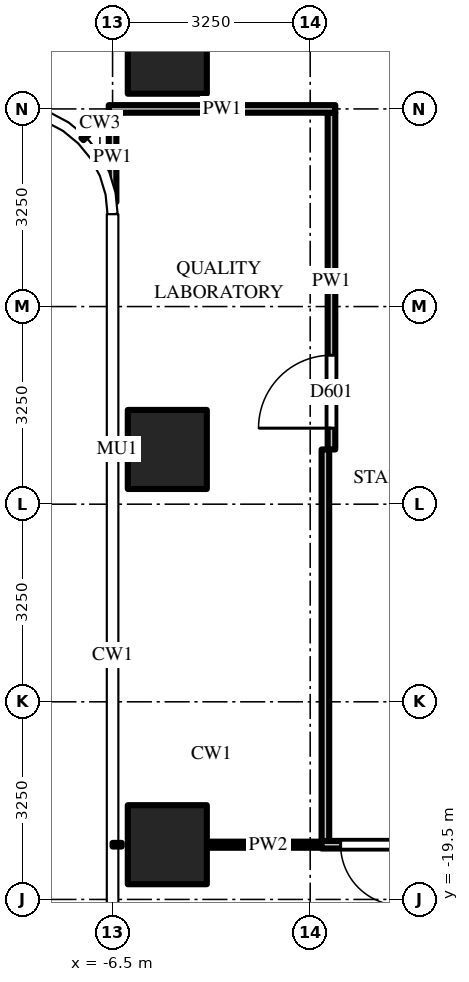
"""IFC4 building model, lengths in metres.
Left out: names, types, materials, properties, quantities, classifications, styles, units other than length and angle.
Written with IfcOpenShell. Run it as: python <this file> out.ifc"""

import sys

from ifc_helpers import new_model, si_unit, direction, frame, frame_2d, origin, origin_2d, place, context, subcontext, project, spatial, rectangle, extrude, source, transform, mapped, element, fill, save


model = new_model("IFC4")
c1 = context("Model", 3, precision=1e-05, world=origin(), true_north=direction((0.0, 1.0)))
c2 = subcontext(c1, "Body", "Model", "MODEL_VIEW")
j1 = project(units=[si_unit("LENGTHUNIT", "METRE"), si_unit("PLANEANGLEUNIT", "RADIAN")], contexts=[c1])
p1 = place(None, origin())
s1 = spatial("IfcSite", under=j1, at=p1, CompositionType="ELEMENT")
p2 = place(p1, origin())
s2 = spatial("IfcBuilding", under=s1, at=p2, CompositionType="ELEMENT")
p3 = place(p2, frame((0.0, 0.0, 129.0)))
s3 = spatial("IfcBuildingStorey", under=s2, at=p3, CompositionType="ELEMENT", Elevation=129.0)
m1 = source(origin(), c2, "Body", "SweptSolid", [
    extrude(rectangle(XDim=1.3, YDim=1.3, at=origin_2d()), origin(), (0.0, 0.0, 1.0), 4.5),
])
for number, where, z_axis, x_axis in (
    (1, (-5.6, -5.6, 0.0), (0.0, 0.0, 1.0), (1.0, 0.0, 0.0)),
    (2, (-5.6, -12.1, 0.0), (0.0, 0.0, 1.0), (1.0, 0.0, 0.0)),
    (3, (-5.6, -18.6, 0.0), (0.0, 0.0, 1.0), (1.0, 0.0, 0.0)),
):
    element("IfcColumn", number, at=place(p3, frame(where, z_axis=z_axis, x_axis=x_axis)), inside=s3, PredefinedType="COLUMN", context=c2, shape_type="MappedRepresentation", body=[
        mapped(m1, transform((0.0, 0.0, 0.0))),
    ])
m2 = source(origin(), c2, "Body", "SweptSolid", [
    extrude(rectangle(XDim=1.469, YDim=0.125, at=frame_2d((0.734, 0.0))), origin(), (0.0, 0.0, 1.0), 4.25),
])
p4 = place(p3, frame((-6.5, -6.562, 0.0), z_axis=(0.0, 0.0, 1.0), x_axis=(0.0, -1.0, 0.0)))
e4 = element("IfcWall", 4, at=p4, inside=s3, PredefinedType="PARTITIONING", context=c2, shape_type="MappedRepresentation", body=[
    mapped(m2, transform((0.0, 0.0, 0.0))),
])
m3 = source(origin(), c2, "Body", "SweptSolid", [
    extrude(rectangle(XDim=6.45, YDim=0.125, at=frame_2d((3.225, 0.0))), origin(), (0.0, 0.0, 1.0), 3.468),
])
p5 = place(p3, frame((-3.0, -18.55, 0.0), z_axis=(0.0, 0.0, 1.0), x_axis=(0.0, 1.0, 0.0)))
e5 = element("IfcWall", 5, at=p5, inside=s3, PredefinedType="PARTITIONING", context=c2, shape_type="MappedRepresentation", body=[
    mapped(m3, transform((0.0, 0.0, 0.0))),
])
m4 = source(origin(), c2, "Body", "SweptSolid", [
    extrude(rectangle(XDim=5.538, YDim=0.125, at=frame_2d((2.769, 0.0))), origin(), (0.0, 0.0, 1.0), 3.468),
])
p6 = place(p3, frame((-2.9, -12.1, 0.0), z_axis=(0.0, 0.0, 1.0), x_axis=(0.0, 1.0, 0.0)))
e6 = element("IfcWall", 6, at=p6, inside=s3, PredefinedType="PARTITIONING", context=c2, shape_type="MappedRepresentation", body=[
    mapped(m4, transform((0.0, 0.0, 0.0))),
])
m5 = source(origin(), c2, "Body", "SweptSolid", [
    extrude(rectangle(XDim=1.2, YDim=2.1, at=frame_2d((0.6, 1.05))), frame((0.0, 0.073, 0.0), z_axis=(0.0, -1.0, 0.0), x_axis=(1.0, 0.0, 0.0)), (0.0, 0.0, 1.0), 0.145),
])
p7 = place(p6, frame((0.35, 0.0, 0.0)))
e7 = element("IfcOpeningElement", 7, at=p7, cuts=e6, PredefinedType="OPENING", context=c2, shape_type="MappedRepresentation", body=[
    mapped(m5, transform((0.0, 0.0, 0.0))),
])
m6 = source(origin(), c2, "Body", "SweptSolid", [
    extrude(rectangle(XDim=2.012, YDim=0.1, at=frame_2d((1.006, 0.0))), origin(), (0.0, 0.0, 1.0), 3.697),
])
p8 = place(p3, frame((-4.95, -18.6, 0.0), z_axis=(0.0, 0.0, 1.0), x_axis=(1.0, 0.0, 0.0)))
e8 = element("IfcWall", 8, at=p8, inside=s3, PredefinedType="PARTITIONING", context=c2, shape_type="MappedRepresentation", body=[
    mapped(m6, transform((0.0, 0.0, 0.0))),
])
m7 = source(origin(), c2, "Body", "SweptSolid", [
    extrude(rectangle(XDim=1.562, YDim=0.125, at=frame_2d((0.781, 0.0))), origin(), (0.0, 0.0, 1.0), 3.697),
])
p9 = place(p3, frame((-1.5, -18.6, 0.0), z_axis=(0.0, 0.0, 1.0), x_axis=(-1.0, 0.0, 0.0)))
e9 = element("IfcWall", 9, at=p9, inside=s3, PredefinedType="PARTITIONING", context=c2, shape_type="MappedRepresentation", body=[
    mapped(m7, transform((0.0, 0.0, 0.0))),
])
m8 = source(origin(), c2, "Body", "SweptSolid", [
    extrude(rectangle(XDim=1.0, YDim=2.1, at=frame_2d((0.5, 1.05))), frame((0.0, 0.073, 0.0), z_axis=(0.0, -1.0, 0.0), x_axis=(1.0, 0.0, 0.0)), (0.0, 0.0, 1.0), 0.145),
])
p10 = place(p9, frame((0.25, 0.0, 0.0)))
e10 = element("IfcOpeningElement", 10, at=p10, cuts=e9, PredefinedType="OPENING", context=c2, shape_type="MappedRepresentation", body=[
    mapped(m8, transform((0.0, 0.0, 0.0))),
])
m9 = source(origin(), c2, "Body", "SweptSolid", [
    extrude(rectangle(XDim=3.725, YDim=0.125, at=frame_2d((1.863, 0.0))), origin(), (0.0, 0.0, 1.0), 3.33),
])
p11 = place(p3, frame((-2.837, -6.5, 0.0), z_axis=(0.0, 0.0, 1.0), x_axis=(-1.0, 0.0, 0.0)))
e11 = element("IfcWall", 11, at=p11, inside=s3, PredefinedType="PARTITIONING", context=c2, shape_type="MappedRepresentation", body=[
    mapped(m9, transform((0.0, 0.0, 0.0))),
])
m10 = source(origin(), c2, "Body", "SweptSolid", [
    extrude(rectangle(XDim=1.0, YDim=2.1, at=frame_2d((0.5, 1.05))), frame((0.0, 0.025, 0.0), z_axis=(0.0, -1.0, 0.0), x_axis=(1.0, 0.0, 0.0)), (0.0, 0.0, 1.0), 0.05),
])
p12 = place(p10, origin())
e12 = element("IfcDoor", 12, at=p12, inside=s3, OperationType="SINGLE_SWING_LEFT", PredefinedType="DOOR", context=c2, shape_type="MappedRepresentation", body=[
    mapped(m10, transform((0.0, 0.0, 0.0))),
])
fill(e10, e12)
m11 = source(origin(), c2, "Body", "SweptSolid", [
    extrude(rectangle(XDim=1.2, YDim=2.1, at=frame_2d((0.6, 1.05))), frame((0.0, 0.025, 0.0), z_axis=(0.0, -1.0, 0.0), x_axis=(1.0, 0.0, 0.0)), (0.0, 0.0, 1.0), 0.05),
])
p13 = place(p7, origin())
e13 = element("IfcDoor", 13, at=p13, inside=s3, OperationType="SINGLE_SWING_LEFT", PredefinedType="DOOR", context=c2, shape_type="MappedRepresentation", body=[
    mapped(m11, transform((0.0, 0.0, 0.0))),
])
fill(e7, e13)
save(model, sys.argv[1])
